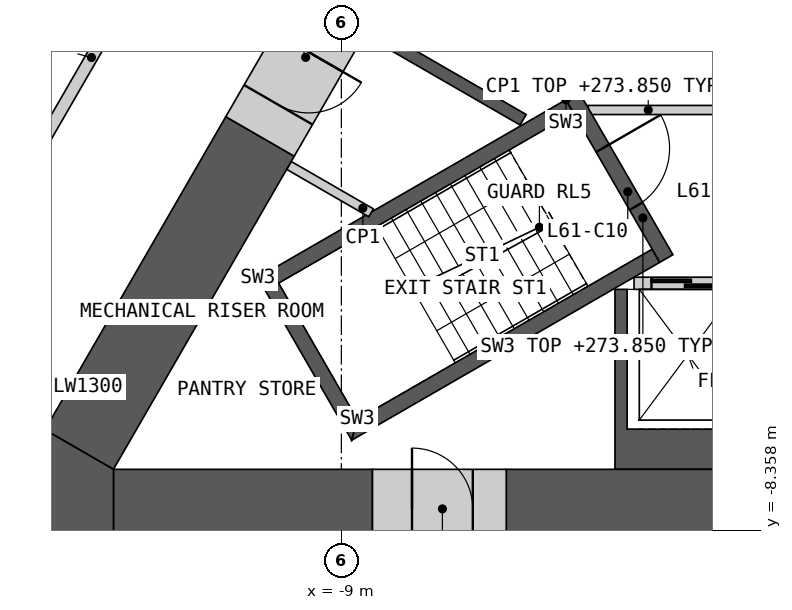
"""IFC4 building model, lengths in metres.
Left out: names, types, materials, properties, quantities, classifications, styles, units other than length and angle.
Written with IfcOpenShell. Run it as: python <this file> out.ifc"""

import sys

from ifc_helpers import new_model, si_unit, direction, frame, frame_2d, origin, place, context, subcontext, project, spatial, polyline, rectangle, outline, extrude, element, fill, save


model = new_model("IFC4")
c1 = context("Model", 3, precision=1e-05, world=origin(), true_north=direction((0.0, 1.0)))
c2 = subcontext(c1, "Body", "Model", "MODEL_VIEW")
j1 = project(units=[si_unit("LENGTHUNIT", "METRE"), si_unit("PLANEANGLEUNIT", "RADIAN")], contexts=[c1])
p1 = place(None, origin())
s1 = spatial("IfcSite", under=j1, at=p1, CompositionType="ELEMENT")
p2 = place(p1, origin())
s2 = spatial("IfcBuilding", under=s1, at=p2, CompositionType="ELEMENT")
p3 = place(p2, frame((0.0, 0.0, 270.6)))
s3 = spatial("IfcBuildingStorey", under=s2, at=p3, CompositionType="ELEMENT", Elevation=270.6)
p4 = place(p3, origin())
e1 = element("IfcWall", 1, at=p4, inside=s3, PredefinedType="SHEAR", context=c2, shape_type="SweptSolid", body=[
    extrude(outline(polyline([(0.1, -7.36), (-4.5, -7.36), (-4.5, -4.4), (-4.3, -4.4), (-4.3, -6.7), (-2.3, -6.7), (-2.3, -4.4), (-2.1, -4.4), (-2.1, -6.7), (-0.1, -6.7), (-0.1, -4.4), (0.1, -4.4), (0.1, -7.36)])), origin(), (0.0, 0.0, 1.0), 3.25),
])
p5 = place(p3, frame((-4.187, -4.3, 0.0), z_axis=(0.0, 0.0, 1.0), x_axis=(1.0, 0.0, 0.0)))
e2 = element("IfcWall", 2, at=p5, inside=s3, PredefinedType="SOLIDWALL", context=c2, shape_type="SweptSolid", body=[
    extrude(rectangle(XDim=8.373, YDim=0.2, at=frame_2d((4.187, 0.0))), origin(), (0.0, 0.0, 1.0), 3.25),
])
p6 = place(p5, frame((0.287, 0.0, 0.0)))
e3 = element("IfcOpeningElement", 3, at=p6, cuts=e2, PredefinedType="OPENING", context=c2, shape_type="SweptSolid", body=[
    extrude(rectangle(XDim=1.2, YDim=2.1, at=frame_2d((0.6, 1.05))), frame((0.0, 0.11, 0.0), z_axis=(0.0, -1.0, 0.0), x_axis=(1.0, 0.0, 0.0)), (0.0, 0.0, 1.0), 0.22),
])
p7 = place(p5, frame((2.387, 0.0, 0.0)))
e4 = element("IfcOpeningElement", 4, at=p7, cuts=e2, PredefinedType="OPENING", context=c2, shape_type="SweptSolid", body=[
    extrude(rectangle(XDim=1.4, YDim=2.1, at=frame_2d((0.7, 1.05))), frame((0.0, 0.11, 0.0), z_axis=(0.0, -1.0, 0.0), x_axis=(1.0, 0.0, 0.0)), (0.0, 0.0, 1.0), 0.22),
])
p8 = place(p5, frame((4.837, 0.0, 0.0)))
e5 = element("IfcOpeningElement", 5, at=p8, cuts=e2, PredefinedType="OPENING", context=c2, shape_type="SweptSolid", body=[
    extrude(rectangle(XDim=0.9, YDim=2.1, at=frame_2d((0.45, 1.05))), frame((0.0, 0.11, 0.0), z_axis=(0.0, -1.0, 0.0), x_axis=(1.0, 0.0, 0.0)), (0.0, 0.0, 1.0), 0.22),
])
p9 = place(p5, frame((6.887, 0.0, 0.0)))
e6 = element("IfcOpeningElement", 6, at=p9, cuts=e2, PredefinedType="OPENING", context=c2, shape_type="SweptSolid", body=[
    extrude(rectangle(XDim=1.2, YDim=2.1, at=frame_2d((0.6, 1.05))), frame((0.0, 0.11, 0.0), z_axis=(0.0, -1.0, 0.0), x_axis=(1.0, 0.0, 0.0)), (0.0, 0.0, 1.0), 0.22),
])
p10 = place(p3, origin())
e7 = element("IfcWall", 7, at=p10, inside=s3, PredefinedType="SHEAR", context=c2, shape_type="SweptSolid", body=[
    extrude(outline(polyline([(-8.524, -0.044), (-8.131, -0.271), (-5.96, -1.524), (-6.061, -1.697), (-8.231, -0.444), (-8.624, -0.217), (-8.524, -0.044)])), origin(), (0.0, 0.0, 1.0), 3.25),
])
p11 = place(p3, frame((-4.941, -1.45, 0.0), z_axis=(0.0, 0.0, 1.0), x_axis=(1.0, 0.0, 0.0)))
e8 = element("IfcWall", 8, at=p11, inside=s3, PredefinedType="PARTITIONING", context=c2, shape_type="SweptSolid", body=[
    extrude(rectangle(XDim=9.882, YDim=0.15, at=frame_2d((4.941, 0.0))), origin(), (0.0, 0.0, 1.0), 3.25),
])
p12 = place(p11, frame((4.391, 0.0, 0.0)))
e9 = element("IfcOpeningElement", 9, at=p12, cuts=e8, PredefinedType="OPENING", context=c2, shape_type="SweptSolid", body=[
    extrude(rectangle(XDim=1.1, YDim=2.1, at=frame_2d((0.55, 1.05))), frame((0.0, 0.085, 0.0), z_axis=(0.0, -1.0, 0.0), x_axis=(1.0, 0.0, 0.0)), (0.0, 0.0, 1.0), 0.17),
])
p13 = place(p3, origin())
e10 = element("IfcWall", 10, at=p13, inside=s3, PredefinedType="SHEAR", context=c2, shape_type="SweptSolid", body=[
    extrude(outline(polyline([(-5.307, -1.281), (-10.374, -4.206), (-10.032, -4.298), (-5.182, -1.498), (-5.307, -1.281)])), origin(), (0.0, 0.0, 1.0), 3.25),
])
p14 = place(p3, origin())
e11 = element("IfcWall", 11, at=p14, inside=s3, PredefinedType="SHEAR", context=c2, shape_type="SweptSolid", body=[
    extrude(outline(polyline([(-10.374, -4.206), (-8.83, -6.881), (-8.738, -6.539), (-10.032, -4.298), (-10.374, -4.206)])), origin(), (0.0, 0.0, 1.0), 3.25),
])
p15 = place(p3, origin())
e12 = element("IfcWall", 12, at=p15, inside=s3, PredefinedType="SHEAR", context=c2, shape_type="SweptSolid", body=[
    extrude(outline(polyline([(-8.738, -6.539), (-8.83, -6.881), (-3.763, -3.956), (-3.888, -3.739), (-8.738, -6.539)])), origin(), (0.0, 0.0, 1.0), 3.25),
])
p16 = place(p3, frame((-5.199, -1.219, 0.0), z_axis=(0.0, 0.0, 1.0), x_axis=(0.499982516597, -0.866035497597, 0.0)))
e13 = element("IfcWall", 13, at=p16, inside=s3, PredefinedType="SHEAR", context=c2, shape_type="SweptSolid", body=[
    extrude(rectangle(XDim=3.088, YDim=0.25, at=frame_2d((1.544, 0.0))), origin(), (0.0, 0.0, 1.0), 3.25),
])
p17 = place(p16, frame((0.994, 0.0, 0.0)))
e14 = element("IfcOpeningElement", 14, at=p17, cuts=e13, PredefinedType="OPENING", context=c2, shape_type="SweptSolid", body=[
    extrude(rectangle(XDim=1.1, YDim=2.1, at=frame_2d((0.55, 1.05))), frame((0.0, 0.135, 0.0), z_axis=(0.0, -1.0, 0.0), x_axis=(1.0, 0.0, 0.0)), (0.0, 0.0, 1.0), 0.27),
])
p18 = place(p3, frame((-9.862, -2.361, 0.0), z_axis=(0.0, 0.0, 1.0), x_axis=(0.865990094875, -0.500061151839, 0.0)))
e15 = element("IfcWall", 15, at=p18, inside=s3, PredefinedType="PARTITIONING", context=c2, shape_type="SweptSolid", body=[
    extrude(rectangle(XDim=1.56, YDim=0.15, at=frame_2d((0.78, 0.0))), origin(), (0.0, 0.0, 1.0), 3.25),
])
p19 = place(p3, frame((-6.288, -8.01, 0.0), z_axis=(0.0, 0.0, 1.0), x_axis=(1.0, 0.0, 0.0)))
e16 = element("IfcWall", 16, at=p19, inside=s3, PredefinedType="SHEAR", context=c2, shape_type="SweptSolid", body=[
    extrude(rectangle(XDim=12.576, YDim=1.3, at=frame_2d((6.288, 0.0))), origin(), (0.0, 0.0, 1.0), 3.25),
])
p20 = place(p3, frame((-12.748, -8.01, 0.0), z_axis=(0.0, 0.0, 1.0), x_axis=(1.0, 0.0, 0.0)))
e17 = element("IfcWall", 17, at=p20, inside=s3, PredefinedType="SHEAR", context=c2, shape_type="SweptSolid", body=[
    extrude(rectangle(XDim=4.26, YDim=1.3, at=frame_2d((2.13, 0.0))), origin(), (0.0, 0.0, 1.0), 3.25),
])
p21 = place(p3, frame((-10.338, -1.885, 0.0), z_axis=(0.0, 0.0, 1.0), x_axis=(-0.499975944838, -0.866039291593, 0.0)))
e18 = element("IfcWall", 18, at=p21, inside=s3, PredefinedType="SHEAR", context=c2, shape_type="SweptSolid", body=[
    extrude(rectangle(XDim=5.947, YDim=1.3, at=frame_2d((2.974, 0.0))), origin(), (0.0, 0.0, 1.0), 3.25),
])
p22 = place(p3, origin())
e19 = element("IfcWall", 19, at=p22, inside=s3, PredefinedType="SHEAR", context=c2, shape_type="SweptSolid", body=[
    extrude(outline(polyline([(-13.874, -6.71), (-12.748, -7.36), (-12.748, -8.66), (-15.0, -8.66), (-13.874, -6.71)])), origin(), (0.0, 0.0, 1.0), 3.25),
])
p23 = place(p3, frame((-8.488, -8.01, 0.0), z_axis=(0.0, 0.0, 1.0), x_axis=(1.0, 0.0, 0.0)))
e20 = element("IfcWall", 20, at=p23, inside=s3, PredefinedType="SHEAR", context=c2, shape_type="SweptSolid", body=[
    extrude(rectangle(XDim=2.2, YDim=1.3, at=frame_2d((1.1, 0.0))), origin(), (0.0, 0.0, 1.0), 3.25),
])
p24 = place(p23, frame((0.65, 0.0, 0.0)))
e21 = element("IfcOpeningElement", 21, at=p24, cuts=e20, PredefinedType="OPENING", context=c2, shape_type="SweptSolid", body=[
    extrude(rectangle(XDim=1.0, YDim=2.1, at=frame_2d((0.5, 1.05))), frame((0.0, 0.66, 0.0), z_axis=(0.0, -1.0, 0.0), x_axis=(1.0, 0.0, 0.0)), (0.0, 0.0, 1.0), 1.32),
])
p25 = place(p3, frame((-9.137, 0.195, 0.0), z_axis=(0.0, 0.0, 1.0), x_axis=(-0.500009943768, -0.866019662671, 0.0)))
e22 = element("IfcWall", 22, at=p25, inside=s3, PredefinedType="SHEAR", context=c2, shape_type="SweptSolid", body=[
    extrude(rectangle(XDim=2.401, YDim=1.3, at=frame_2d((1.201, 0.0))), origin(), (0.0, 0.0, 1.0), 3.25),
])
p26 = place(p25, frame((0.8, 0.0, 0.0)))
e23 = element("IfcOpeningElement", 23, at=p26, cuts=e22, PredefinedType="OPENING", context=c2, shape_type="SweptSolid", body=[
    extrude(rectangle(XDim=1.0, YDim=2.1, at=frame_2d((0.5, 1.05))), frame((0.0, 0.66, 0.0), z_axis=(0.0, -1.0, 0.0), x_axis=(1.0, 0.0, 0.0)), (0.0, 0.0, 1.0), 1.32),
])
p27 = place(p3, frame((-14.247, -2.556, 0.0), z_axis=(0.0, 0.0, 1.0), x_axis=(0.49998193945, 0.866035830797, 0.0)))
e24 = element("IfcWall", 24, at=p27, inside=s3, PredefinedType="PARTITIONING", context=c2, shape_type="SweptSolid", body=[
    extrude(rectangle(XDim=9.094, YDim=0.2, at=frame_2d((4.547, 0.0))), origin(), (0.0, 0.0, 1.0), 3.25),
])
p28 = place(p27, frame((6.833, 0.0, 0.0)))
e25 = element("IfcOpeningElement", 25, at=p28, cuts=e24, PredefinedType="OPENING", context=c2, shape_type="SweptSolid", body=[
    extrude(rectangle(XDim=1.1, YDim=2.1, at=frame_2d((0.55, 1.05))), frame((0.0, 0.11, 0.0), z_axis=(0.0, -1.0, 0.0), x_axis=(1.0, 0.0, 0.0)), (0.0, 0.0, 1.0), 0.22),
])
p29 = place(p6, origin())
e26 = element("IfcDoor", 26, at=p29, inside=s3, OperationType="SLIDING_TO_LEFT", PredefinedType="DOOR", context=c2, shape_type="SweptSolid", body=[
    extrude(rectangle(XDim=1.2, YDim=2.1, at=frame_2d((0.6, 1.05))), frame((0.0, 0.025, 0.0), z_axis=(0.0, -1.0, 0.0), x_axis=(1.0, 0.0, 0.0)), (0.0, 0.0, 1.0), 0.05),
])
fill(e3, e26)
p30 = place(p17, origin())
e27 = element("IfcDoor", 27, at=p30, inside=s3, OperationType="SINGLE_SWING_LEFT", PredefinedType="DOOR", context=c2, shape_type="SweptSolid", body=[
    extrude(rectangle(XDim=1.1, YDim=2.1, at=frame_2d((0.55, 1.05))), frame((0.0, 0.025, 0.0), z_axis=(0.0, -1.0, 0.0), x_axis=(1.0, 0.0, 0.0)), (0.0, 0.0, 1.0), 0.05),
])
fill(e14, e27)
p31 = place(p24, origin())
e28 = element("IfcDoor", 28, at=p31, inside=s3, OperationType="SINGLE_SWING_LEFT", PredefinedType="DOOR", context=c2, shape_type="SweptSolid", body=[
    extrude(rectangle(XDim=1.0, YDim=2.1, at=frame_2d((0.5, 1.05))), frame((0.0, 0.405, 0.0), z_axis=(0.0, -1.0, 0.0), x_axis=(1.0, 0.0, 0.0)), (0.0, 0.0, 1.0), 0.05),
])
fill(e21, e28)
p32 = place(p26, origin())
e29 = element("IfcDoor", 29, at=p32, inside=s3, OperationType="SINGLE_SWING_LEFT", PredefinedType="DOOR", context=c2, shape_type="SweptSolid", body=[
    extrude(rectangle(XDim=1.0, YDim=2.1, at=frame_2d((0.5, 1.05))), frame((0.0, 0.405, 0.0), z_axis=(0.0, -1.0, 0.0), x_axis=(1.0, 0.0, 0.0)), (0.0, 0.0, 1.0), 0.05),
])
fill(e23, e29)
save(model, sys.argv[1])
